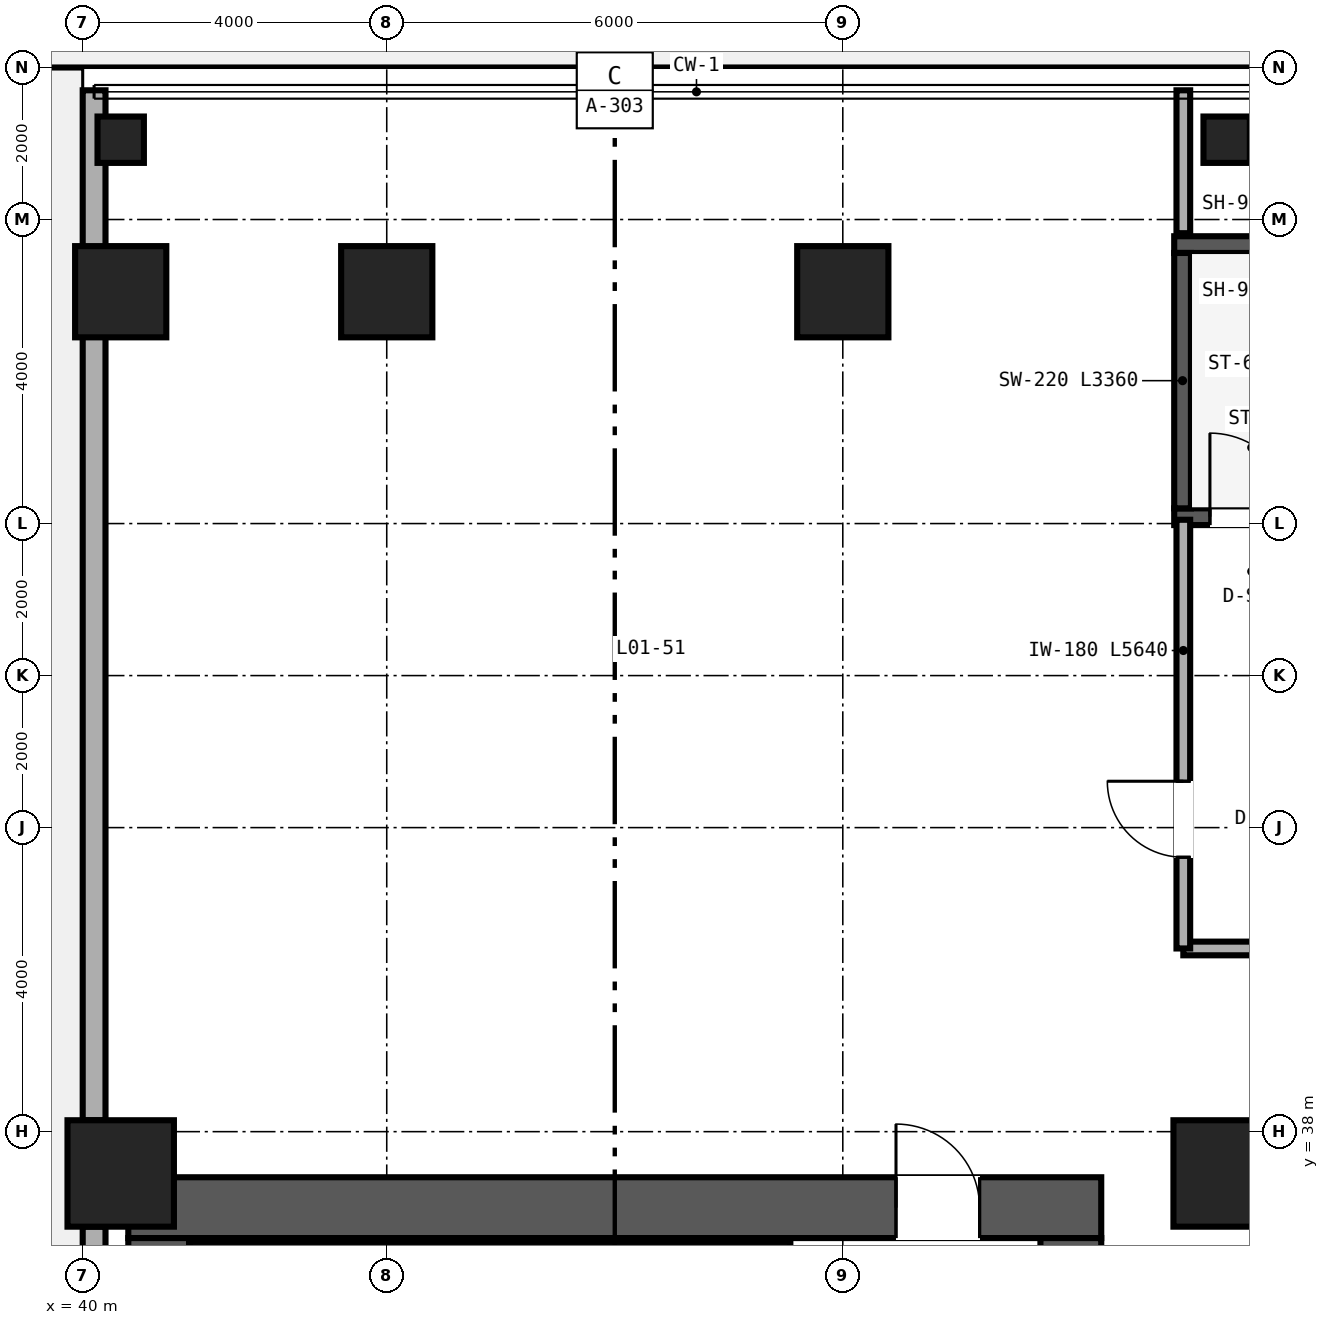
"""IFC4 building model, lengths in metres.
Left out: names, types, materials, properties, quantities, classifications, styles, units other than length and angle.
Written with IfcOpenShell. Run it as: python <this file> out.ifc"""

import sys

from ifc_helpers import new_model, si_unit, direction, frame, frame_2d, origin, origin_2d, place, context, subcontext, project, spatial, rectangle, hollow_circle, extrude, source, transform, mapped, element, fill, save


model = new_model("IFC4")
c1 = context("Model", 3, precision=1e-05, world=origin(), true_north=direction((0.0, 1.0)))
c2 = subcontext(c1, "Body", "Model", "MODEL_VIEW")
j1 = project(units=[si_unit("LENGTHUNIT", "METRE"), si_unit("PLANEANGLEUNIT", "RADIAN")], contexts=[c1])
p1 = place(None, origin())
s1 = spatial("IfcSite", under=j1, at=p1, CompositionType="ELEMENT")
p2 = place(p1, origin())
s2 = spatial("IfcBuilding", under=s1, at=p2, CompositionType="ELEMENT")
p3 = place(p2, origin())
s3 = spatial("IfcBuildingStorey", under=s2, at=p3, CompositionType="ELEMENT", Elevation=0.0)
p4 = place(p3, frame((40.6, 37.0, 0.0), z_axis=(0.0, 0.0, 1.0), x_axis=(1.0, 0.0, 0.0)))
e1 = element("IfcWall", 1, at=p4, inside=s3, PredefinedType="SHEAR", context=c2, shape_type="SweptSolid", body=[
    extrude(rectangle(XDim=12.8, YDim=0.8, at=frame_2d((6.4, 0.0))), origin(), (0.0, 0.0, 1.0), 5.71),
])
p5 = place(p4, frame((10.1, 0.0, 0.0)))
e2 = element("IfcOpeningElement", 2, at=p5, cuts=e1, PredefinedType="OPENING", context=c2, shape_type="SweptSolid", body=[
    extrude(rectangle(XDim=1.1, YDim=2.15, at=frame_2d((0.55, 1.075))), frame((0.0, 0.41, 0.0), z_axis=(0.0, -1.0, 0.0), x_axis=(1.0, 0.0, 0.0)), (0.0, 0.0, 1.0), 0.82),
])
p6 = place(p3, frame((41.0, 15.4, 0.0), z_axis=(0.0, 0.0, 1.0), x_axis=(0.0, 1.0, 0.0)))
e3 = element("IfcWall", 3, at=p6, inside=s3, PredefinedType="SHEAR", context=c2, shape_type="SweptSolid", body=[
    extrude(rectangle(XDim=21.2, YDim=0.8, at=frame_2d((10.6, 0.0))), origin(), (0.0, 0.0, 1.0), 5.71),
])
p7 = place(p3, frame((53.0, 15.4, 0.0), z_axis=(0.0, 0.0, 1.0), x_axis=(0.0, 1.0, 0.0)))
e4 = element("IfcWall", 4, at=p7, inside=s3, PredefinedType="SHEAR", context=c2, shape_type="SweptSolid", body=[
    extrude(rectangle(XDim=21.2, YDim=0.8, at=frame_2d((10.6, 0.0))), origin(), (0.0, 0.0, 1.0), 5.71),
])
p8 = place(p7, frame((16.15, 0.0, 0.0)))
e5 = element("IfcOpeningElement", 5, at=p8, cuts=e4, PredefinedType="OPENING", context=c2, shape_type="SweptSolid", body=[
    extrude(rectangle(XDim=1.1, YDim=2.15, at=frame_2d((0.55, 1.075))), frame((0.0, 0.41, 0.0), z_axis=(0.0, -1.0, 0.0), x_axis=(1.0, 0.0, 0.0)), (0.0, 0.0, 1.0), 0.82),
])
p9 = place(p3, frame((41.4, 36.44, 0.0), z_axis=(0.0, 0.0, 1.0), x_axis=(1.0, 0.0, 0.0)))
e6 = element("IfcWall", 6, at=p9, inside=s3, PredefinedType="SHEAR", context=c2, shape_type="SweptSolid", body=[
    extrude(rectangle(XDim=7.91, YDim=0.22, at=frame_2d((3.955, 0.0))), origin(), (0.0, 0.0, 1.0), 5.8),
])
p10 = place(p3, frame((54.36, 46.09, 0.0), z_axis=(0.0, 0.0, 1.0), x_axis=(1.0, 0.0, 0.0)))
e7 = element("IfcWall", 7, at=p10, inside=s3, PredefinedType="SHEAR", context=c2, shape_type="SweptSolid", body=[
    extrude(rectangle(XDim=8.06, YDim=0.22, at=frame_2d((4.03, 0.0))), origin(), (0.0, 0.0, 1.0), 5.8),
])
p11 = place(p10, frame((0.47, 0.0, 0.0)))
e8 = element("IfcOpeningElement", 8, at=p11, cuts=e7, PredefinedType="OPENING", context=c2, shape_type="SweptSolid", body=[
    extrude(rectangle(XDim=1.1, YDim=2.15, at=frame_2d((0.55, 1.075))), frame((0.0, 0.12, 0.0), z_axis=(0.0, -1.0, 0.0), x_axis=(1.0, 0.0, 0.0)), (0.0, 0.0, 1.0), 0.24),
])
p12 = place(p3, frame((54.36, 49.67, 0.0), z_axis=(0.0, 0.0, 1.0), x_axis=(1.0, 0.0, 0.0)))
e9 = element("IfcWall", 9, at=p12, inside=s3, PredefinedType="SHEAR", context=c2, shape_type="SweptSolid", body=[
    extrude(rectangle(XDim=8.06, YDim=0.22, at=frame_2d((4.03, 0.0))), origin(), (0.0, 0.0, 1.0), 5.8),
])
p13 = place(p3, frame((54.47, 46.2, 0.0), z_axis=(0.0, 0.0, 1.0), x_axis=(0.0, 1.0, 0.0)))
e10 = element("IfcWall", 10, at=p13, inside=s3, PredefinedType="SHEAR", context=c2, shape_type="SweptSolid", body=[
    extrude(rectangle(XDim=3.36, YDim=0.22, at=frame_2d((1.68, 0.0))), origin(), (0.0, 0.0, 1.0), 5.8),
])
m1 = source(origin(), c2, "Body", "SweptSolid", [
    extrude(hollow_circle(Radius=0.305, WallThickness=0.025, at=origin_2d()), origin(), (0.0, 0.0, 1.0), 5.71),
])
for number, where, z_axis, x_axis in (
    (11, (40.5, 51.05, 0.0), (0.0, 0.0, 1.0), (1.0, 0.0, 0.0)),
    (12, (55.05, 51.05, 0.0), (0.0, 0.0, 1.0), (1.0, 0.0, 0.0)),
):
    element("IfcColumn", number, at=place(p3, frame(where, z_axis=z_axis, x_axis=x_axis)), inside=s3, PredefinedType="COLUMN", context=c2, shape_type="MappedRepresentation", body=[
        mapped(m1, transform((0.0, 0.0, 0.0), scale=1.0)),
    ])
m2 = source(origin(), c2, "Body", "SweptSolid", [
    extrude(rectangle(XDim=1.4, YDim=1.4, at=origin_2d()), origin(), (0.0, 0.0, 1.0), 5.71),
])
for number, where, z_axis, x_axis in (
    (13, (40.5, 37.45, 0.0), (0.0, 0.0, 1.0), (1.0, 0.0, 0.0)),
    (14, (55.05, 37.45, 0.0), (0.0, 0.0, 1.0), (1.0, 0.0, 0.0)),
):
    element("IfcColumn", number, at=place(p3, frame(where, z_axis=z_axis, x_axis=x_axis)), inside=s3, PredefinedType="COLUMN", context=c2, shape_type="MappedRepresentation", body=[
        mapped(m2, transform((0.0, 0.0, 0.0), scale=1.0)),
    ])
m3 = source(origin(), c2, "Body", "SweptSolid", [
    extrude(rectangle(XDim=1.2, YDim=1.2, at=origin_2d()), origin(), (0.0, 0.0, 1.0), 5.71),
])
for number, where, z_axis, x_axis in (
    (15, (40.5, 49.05, 0.0), (0.0, 0.0, 1.0), (1.0, 0.0, 0.0)),
    (16, (44.0, 49.05, 0.0), (0.0, 0.0, 1.0), (1.0, 0.0, 0.0)),
    (17, (50.0, 49.05, 0.0), (0.0, 0.0, 1.0), (1.0, 0.0, 0.0)),
):
    element("IfcColumn", number, at=place(p3, frame(where, z_axis=z_axis, x_axis=x_axis)), inside=s3, PredefinedType="COLUMN", context=c2, shape_type="MappedRepresentation", body=[
        mapped(m3, transform((0.0, 0.0, 0.0), scale=1.0)),
    ])
p14 = place(p3, frame((40.15, 38.15, 0.0), z_axis=(0.0, 0.0, 1.0), x_axis=(0.0, 1.0, 0.0)))
e18 = element("IfcWall", 18, at=p14, inside=s3, PredefinedType="SOLIDWALL", context=c2, shape_type="SweptSolid", body=[
    extrude(rectangle(XDim=13.55, YDim=0.3, at=frame_2d((6.775, 0.0))), origin(), (0.0, 0.0, 1.0), 4.783),
])
p15 = place(p3, frame((40.15, 28.85, 0.0), z_axis=(0.0, 0.0, 1.0), x_axis=(0.0, 1.0, 0.0)))
e19 = element("IfcWall", 19, at=p15, inside=s3, PredefinedType="SOLIDWALL", context=c2, shape_type="SweptSolid", body=[
    extrude(rectangle(XDim=7.9, YDim=0.3, at=frame_2d((3.95, 0.0))), origin(), (0.0, 0.0, 1.0), 5.253),
])
p16 = place(p3, frame((54.48, 40.41, 0.0), z_axis=(0.0, 0.0, 1.0), x_axis=(1.0, 0.0, 0.0)))
e20 = element("IfcWall", 20, at=p16, inside=s3, PredefinedType="SOLIDWALL", context=c2, shape_type="SweptSolid", body=[
    extrude(rectangle(XDim=9.17, YDim=0.18, at=frame_2d((4.585, 0.0))), origin(), (0.0, 0.0, 1.0), 4.931),
])
p17 = place(p3, frame((54.48, 40.41, 0.0), z_axis=(0.0, 0.0, 1.0), x_axis=(0.0, 1.0, 0.0)))
e21 = element("IfcWall", 21, at=p17, inside=s3, PredefinedType="SOLIDWALL", context=c2, shape_type="SweptSolid", body=[
    extrude(rectangle(XDim=5.64, YDim=0.18, at=frame_2d((2.82, 0.0))), origin(), (0.0, 0.0, 1.0), 5.71),
])
p18 = place(p17, frame((1.2, 0.0, 0.0)))
e22 = element("IfcOpeningElement", 22, at=p18, cuts=e21, PredefinedType="OPENING", context=c2, shape_type="SweptSolid", body=[
    extrude(rectangle(XDim=1.0, YDim=2.15, at=frame_2d((0.5, 1.075))), frame((0.0, 0.1, 0.0), z_axis=(0.0, -1.0, 0.0), x_axis=(1.0, 0.0, 0.0)), (0.0, 0.0, 1.0), 0.2),
])
p19 = place(p3, frame((54.48, 49.82, 0.0), z_axis=(0.0, 0.0, 1.0), x_axis=(0.0, 1.0, 0.0)))
e23 = element("IfcWall", 23, at=p19, inside=s3, PredefinedType="SOLIDWALL", context=c2, shape_type="SweptSolid", body=[
    extrude(rectangle(XDim=1.88, YDim=0.18, at=frame_2d((0.94, 0.0))), origin(), (0.0, 0.0, 1.0), 4.783),
])
m4 = source(origin(), c2, "Body", "SweptSolid", [
    extrude(rectangle(XDim=1.1, YDim=2.15, at=frame_2d((0.55, 1.075))), frame((0.0, 0.025, 0.0), z_axis=(0.0, -1.0, 0.0), x_axis=(1.0, 0.0, 0.0)), (0.0, 0.0, 1.0), 0.05),
])
p20 = place(p11, origin())
e24 = element("IfcDoor", 24, at=p20, inside=s3, OperationType="SINGLE_SWING_LEFT", PredefinedType="DOOR", context=c2, shape_type="MappedRepresentation", body=[
    mapped(m4, transform((0.0, 0.0, 0.0), scale=1.0)),
])
fill(e8, e24)
p21 = place(p5, origin())
e25 = element("IfcDoor", 25, at=p21, inside=s3, OperationType="SINGLE_SWING_LEFT", PredefinedType="DOOR", context=c2, shape_type="MappedRepresentation", body=[
    mapped(m4, transform((0.0, 0.0, 0.0), scale=1.0)),
])
fill(e2, e25)
m5 = source(origin(), c2, "Body", "SweptSolid", [
    extrude(rectangle(XDim=1.0, YDim=2.15, at=frame_2d((0.5, 1.075))), frame((0.0, 0.025, 0.0), z_axis=(0.0, -1.0, 0.0), x_axis=(1.0, 0.0, 0.0)), (0.0, 0.0, 1.0), 0.05),
])
p22 = place(p18, origin())
e26 = element("IfcDoor", 26, at=p22, inside=s3, OperationType="SINGLE_SWING_RIGHT", PredefinedType="DOOR", context=c2, shape_type="MappedRepresentation", body=[
    mapped(m5, transform((0.0, 0.0, 0.0), scale=1.0)),
])
fill(e22, e26)
save(model, sys.argv[1])
